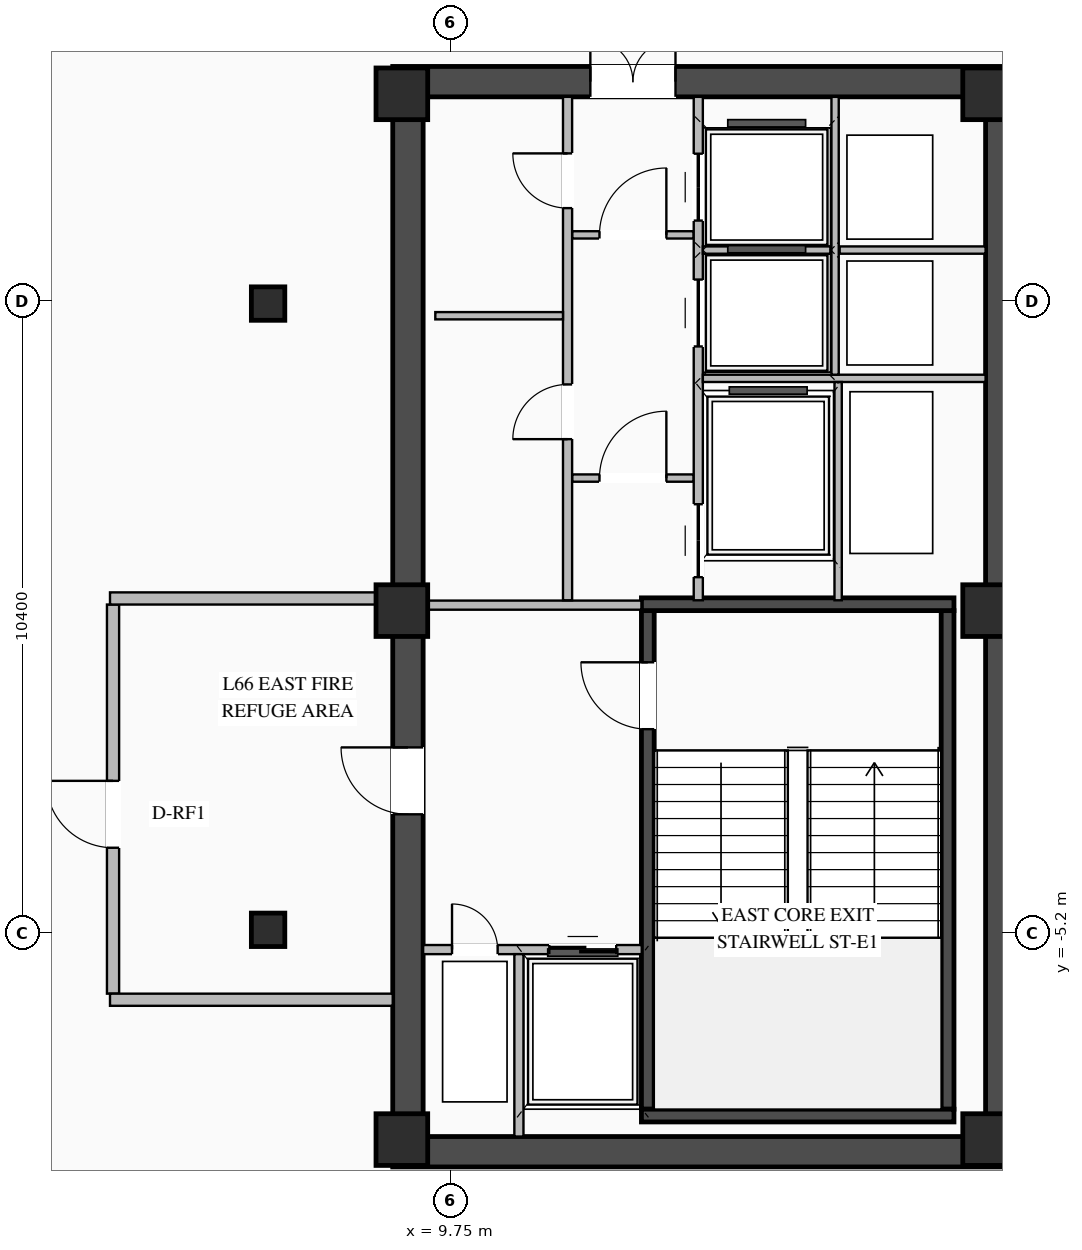
"""IFC4 building model, lengths in metres.
Left out: names, types, materials, properties, quantities, classifications, styles, units other than length and angle.
Written with IfcOpenShell. Run it as: python <this file> out.ifc"""

import sys

from ifc_helpers import new_model, si_unit, direction, frame, frame_2d, origin, origin_2d, place, context, subcontext, project, spatial, rectangle, i_section, extrude, element, fill, save


model = new_model("IFC4")
c1 = context("Model", 3, precision=1e-05, world=origin(), true_north=direction((0.0, 1.0)))
c2 = subcontext(c1, "Body", "Model", "MODEL_VIEW")
j1 = project(units=[si_unit("LENGTHUNIT", "METRE"), si_unit("PLANEANGLEUNIT", "RADIAN")], contexts=[c1])
p1 = place(None, origin())
s1 = spatial("IfcSite", under=j1, at=p1, CompositionType="ELEMENT")
p2 = place(p1, origin())
s2 = spatial("IfcBuilding", under=s1, at=p2, CompositionType="ELEMENT")
p3 = place(p2, frame((0.0, 0.0, 243.0)))
s3 = spatial("IfcBuildingStorey", under=s2, at=p3, CompositionType="ELEMENT", Elevation=243.0)
p4 = place(p3, frame((8.8, -8.8, 0.0), z_axis=(0.0, 0.0, 1.0), x_axis=(1.0, 0.0, 0.0)))
e1 = element("IfcWall", 1, at=p4, inside=s3, PredefinedType="SHEAR", context=c2, shape_type="SweptSolid", body=[
    extrude(rectangle(XDim=10.25, YDim=0.5, at=frame_2d((5.125, 0.0))), origin(), (0.0, 0.0, 1.0), 4.22),
])
p5 = place(p3, frame((8.8, 8.8, 0.0), z_axis=(0.0, 0.0, 1.0), x_axis=(1.0, 0.0, 0.0)))
e2 = element("IfcWall", 2, at=p5, inside=s3, PredefinedType="SHEAR", context=c2, shape_type="SweptSolid", body=[
    extrude(rectangle(XDim=10.25, YDim=0.5, at=frame_2d((5.125, 0.0))), origin(), (0.0, 0.0, 1.0), 4.22),
])
p6 = place(p5, frame((3.25, 0.0, 0.0)))
e3 = element("IfcOpeningElement", 3, at=p6, cuts=e2, PredefinedType="OPENING", context=c2, shape_type="SweptSolid", body=[
    extrude(rectangle(XDim=1.4, YDim=2.05, at=frame_2d((0.7, 1.025))), frame((0.0, 0.26, 0.0), z_axis=(0.0, -1.0, 0.0), x_axis=(1.0, 0.0, 0.0)), (0.0, 0.0, 1.0), 0.52),
])
p7 = place(p3, frame((9.05, -8.55, 0.0), z_axis=(0.0, 0.0, 1.0), x_axis=(0.0, 1.0, 0.0)))
e4 = element("IfcWall", 4, at=p7, inside=s3, PredefinedType="SHEAR", context=c2, shape_type="SweptSolid", body=[
    extrude(rectangle(XDim=17.1, YDim=0.5, at=frame_2d((8.55, 0.0))), origin(), (0.0, 0.0, 1.0), 4.22),
])
p8 = place(p7, frame((5.3, 0.0, 0.0)))
e5 = element("IfcOpeningElement", 5, at=p8, cuts=e4, PredefinedType="OPENING", context=c2, shape_type="SweptSolid", body=[
    extrude(rectangle(XDim=1.1, YDim=2.08, at=frame_2d((0.55, 1.04))), frame((0.0, 0.26, 0.0), z_axis=(0.0, -1.0, 0.0), x_axis=(1.0, 0.0, 0.0)), (0.0, 0.0, 1.0), 0.52),
])
p9 = place(p3, frame((18.8, -8.55, 0.0), z_axis=(0.0, 0.0, 1.0), x_axis=(0.0, 1.0, 0.0)))
e6 = element("IfcWall", 6, at=p9, inside=s3, PredefinedType="SHEAR", context=c2, shape_type="SweptSolid", body=[
    extrude(rectangle(XDim=17.1, YDim=0.5, at=frame_2d((8.55, 0.0))), origin(), (0.0, 0.0, 1.0), 4.22),
])
p10 = place(p3, frame((12.995, -8.1, 0.0), z_axis=(0.0, 0.0, 1.0), x_axis=(0.0, 1.0, 0.0)))
e7 = element("IfcWall", 7, at=p10, inside=s3, PredefinedType="SHEAR", context=c2, shape_type="SweptSolid", body=[
    extrude(rectangle(XDim=8.2, YDim=0.21, at=frame_2d((4.1, 0.0))), origin(), (0.0, 0.0, 1.0), 4.22),
])
p11 = place(p10, frame((6.25, 0.0, 0.0)))
e8 = element("IfcOpeningElement", 8, at=p11, cuts=e7, PredefinedType="OPENING", context=c2, shape_type="SweptSolid", body=[
    extrude(rectangle(XDim=1.1, YDim=2.15, at=frame_2d((0.55, 1.075))), frame((0.0, 0.115, 0.0), z_axis=(0.0, -1.0, 0.0), x_axis=(1.0, 0.0, 0.0)), (0.0, 0.0, 1.0), 0.23),
])
p12 = place(p3, frame((17.925, -8.1, 0.0), z_axis=(0.0, 0.0, 1.0), x_axis=(0.0, 1.0, 0.0)))
e9 = element("IfcWall", 9, at=p12, inside=s3, PredefinedType="SHEAR", context=c2, shape_type="SweptSolid", body=[
    extrude(rectangle(XDim=8.2, YDim=0.21, at=frame_2d((4.1, 0.0))), origin(), (0.0, 0.0, 1.0), 4.22),
])
for number, where, z_axis, x_axis in (
    (10, (12.89, -8.205, 0.0), (0.0, 0.0, 1.0), (1.0, 0.0, 0.0)),
    (11, (18.03, 0.205, 0.0), (0.0, 0.0, 1.0), (-1.0, 0.0, 0.0)),
):
    element("IfcWall", number, at=place(p3, frame(where, z_axis=z_axis, x_axis=x_axis)), inside=s3, PredefinedType="SHEAR", context=c2, shape_type="SweptSolid", body=[
        extrude(rectangle(XDim=5.14, YDim=0.21, at=frame_2d((2.57, 0.0))), origin(), (0.0, 0.0, 1.0), 4.22),
    ])
for number, where, z_axis, x_axis in (
    (12, (8.95, -8.6, 0.0), (0.0, 0.0, 1.0), (1.0, 0.0, 0.0)),
    (13, (8.95, 0.1, 0.0), (0.0, 0.0, 1.0), (1.0, 0.0, 0.0)),
    (14, (8.95, 8.6, 0.0), (0.0, 0.0, 1.0), (1.0, 0.0, 0.0)),
    (15, (18.6, -8.6, 0.0), (0.0, 0.0, 1.0), (1.0, 0.0, 0.0)),
    (16, (18.6, 0.1, 0.0), (0.0, 0.0, 1.0), (1.0, 0.0, 0.0)),
    (17, (18.6, 8.6, 0.0), (0.0, 0.0, 1.0), (1.0, 0.0, 0.0)),
):
    element("IfcColumn", number, at=place(p3, frame(where, z_axis=z_axis, x_axis=x_axis)), inside=s3, PredefinedType="COLUMN", context=c2, shape_type="SweptSolid", body=[
        extrude(rectangle(XDim=0.85, YDim=0.85, at=origin_2d()), origin(), (0.0, 0.0, 1.0), 4.5),
    ])
for number, where, z_axis, x_axis in (
    (18, (6.75, -5.15, 0.0), (0.0, 0.0, 1.0), (1.0, 0.0, 0.0)),
    (19, (6.75, 5.15, 0.0), (0.0, 0.0, 1.0), (1.0, 0.0, 0.0)),
):
    element("IfcColumn", number, at=place(p3, frame(where, z_axis=z_axis, x_axis=x_axis)), inside=s3, PredefinedType="COLUMN", context=c2, shape_type="SweptSolid", body=[
        extrude(i_section(OverallWidth=0.55, OverallDepth=0.55, WebThickness=0.024, FlangeThickness=0.036, at=origin_2d()), origin(), (0.0, 0.0, 1.0), 4.5),
    ])
p13 = place(p3, frame((9.3, -5.475, 0.0), z_axis=(0.0, 0.0, 1.0), x_axis=(1.0, 0.0, 0.0)))
e20 = element("IfcWall", 20, at=p13, inside=s3, PredefinedType="STANDARD", context=c2, shape_type="SweptSolid", body=[
    extrude(rectangle(XDim=3.595, YDim=0.15, at=frame_2d((1.797, 0.0))), origin(), (0.0, 0.0, 1.0), 4.2),
])
p14 = place(p13, frame((2.075, 0.0, 0.0)))
e21 = element("IfcOpeningElement", 21, at=p14, cuts=e20, PredefinedType="OPENING", context=c2, shape_type="SweptSolid", body=[
    extrude(rectangle(XDim=1.1, YDim=2.15, at=frame_2d((0.55, 1.075))), frame((0.0, 0.085, 0.0), z_axis=(0.0, -1.0, 0.0), x_axis=(1.0, 0.0, 0.0)), (0.0, 0.0, 1.0), 0.17),
])
p15 = place(p13, frame((0.475, 0.0, 0.0)))
e22 = element("IfcOpeningElement", 22, at=p15, cuts=e20, PredefinedType="OPENING", context=c2, shape_type="SweptSolid", body=[
    extrude(rectangle(XDim=0.75, YDim=2.05, at=frame_2d((0.375, 1.025))), frame((0.0, 0.085, 0.0), z_axis=(0.0, -1.0, 0.0), x_axis=(1.0, 0.0, 0.0)), (0.0, 0.0, 1.0), 0.17),
])
p16 = place(p3, frame((10.875, -8.55, 0.0), z_axis=(0.0, 0.0, 1.0), x_axis=(0.0, 1.0, 0.0)))
e23 = element("IfcWall", 23, at=p16, inside=s3, PredefinedType="STANDARD", context=c2, shape_type="SweptSolid", body=[
    extrude(rectangle(XDim=3.0, YDim=0.15, at=frame_2d((1.5, 0.0))), origin(), (0.0, 0.0, 1.0), 4.2),
])
p17 = place(p3, frame((9.3, 0.19, 0.0), z_axis=(0.0, 0.0, 1.0), x_axis=(1.0, 0.0, 0.0)))
e24 = element("IfcWall", 24, at=p17, inside=s3, PredefinedType="STANDARD", context=c2, shape_type="SweptSolid", body=[
    extrude(rectangle(XDim=3.59, YDim=0.15, at=frame_2d((1.795, 0.0))), origin(), (0.0, 0.0, 1.0), 3.595),
])
p18 = place(p3, frame((11.75, 2.28, 0.0), z_axis=(0.0, 0.0, 1.0), x_axis=(1.0, 0.0, 0.0)))
e25 = element("IfcWall", 25, at=p18, inside=s3, PredefinedType="STANDARD", context=c2, shape_type="SweptSolid", body=[
    extrude(rectangle(XDim=2.0, YDim=0.12, at=frame_2d((1.0, 0.0))), origin(), (0.0, 0.0, 1.0), 4.2),
])
p19 = place(p18, frame((0.45, 0.0, 0.0)))
e26 = element("IfcOpeningElement", 26, at=p19, cuts=e25, PredefinedType="OPENING", context=c2, shape_type="SweptSolid", body=[
    extrude(rectangle(XDim=1.1, YDim=2.1, at=frame_2d((0.55, 1.05))), frame((0.0, 0.07, 0.0), z_axis=(0.0, -1.0, 0.0), x_axis=(1.0, 0.0, 0.0)), (0.0, 0.0, 1.0), 0.14),
])
p20 = place(p3, frame((11.75, 6.28, 0.0), z_axis=(0.0, 0.0, 1.0), x_axis=(1.0, 0.0, 0.0)))
e27 = element("IfcWall", 27, at=p20, inside=s3, PredefinedType="STANDARD", context=c2, shape_type="SweptSolid", body=[
    extrude(rectangle(XDim=2.0, YDim=0.12, at=frame_2d((1.0, 0.0))), origin(), (0.0, 0.0, 1.0), 4.2),
])
p21 = place(p20, frame((0.45, 0.0, 0.0)))
e28 = element("IfcOpeningElement", 28, at=p21, cuts=e27, PredefinedType="OPENING", context=c2, shape_type="SweptSolid", body=[
    extrude(rectangle(XDim=1.1, YDim=2.1, at=frame_2d((0.55, 1.05))), frame((0.0, 0.07, 0.0), z_axis=(0.0, -1.0, 0.0), x_axis=(1.0, 0.0, 0.0)), (0.0, 0.0, 1.0), 0.14),
])
p22 = place(p3, frame((11.675, 0.27, 0.0), z_axis=(0.0, 0.0, 1.0), x_axis=(0.0, 1.0, 0.0)))
e29 = element("IfcWall", 29, at=p22, inside=s3, PredefinedType="STANDARD", context=c2, shape_type="SweptSolid", body=[
    extrude(rectangle(XDim=8.28, YDim=0.15, at=frame_2d((4.14, 0.0))), origin(), (0.0, 0.0, 1.0), 4.2),
])
p23 = place(p22, frame((2.65, 0.0, 0.0)))
e30 = element("IfcOpeningElement", 30, at=p23, cuts=e29, PredefinedType="OPENING", context=c2, shape_type="SweptSolid", body=[
    extrude(rectangle(XDim=0.9, YDim=2.05, at=frame_2d((0.45, 1.025))), frame((0.0, 0.085, 0.0), z_axis=(0.0, -1.0, 0.0), x_axis=(1.0, 0.0, 0.0)), (0.0, 0.0, 1.0), 0.17),
])
p24 = place(p22, frame((6.45, 0.0, 0.0)))
e31 = element("IfcOpeningElement", 31, at=p24, cuts=e29, PredefinedType="OPENING", context=c2, shape_type="SweptSolid", body=[
    extrude(rectangle(XDim=0.9, YDim=2.05, at=frame_2d((0.45, 1.025))), frame((0.0, 0.085, 0.0), z_axis=(0.0, -1.0, 0.0), x_axis=(1.0, 0.0, 0.0)), (0.0, 0.0, 1.0), 0.17),
])
p25 = place(p3, frame((9.5, 4.95, 0.0), z_axis=(0.0, 0.0, 1.0), x_axis=(1.0, 0.0, 0.0)))
e32 = element("IfcWall", 32, at=p25, inside=s3, PredefinedType="STANDARD", context=c2, shape_type="SweptSolid", body=[
    extrude(rectangle(XDim=2.1, YDim=0.12, at=frame_2d((1.05, 0.0))), origin(), (0.0, 0.0, 1.0), 4.2),
])
p26 = place(p3, frame((13.825, 0.27, 0.0), z_axis=(0.0, 0.0, 1.0), x_axis=(0.0, 1.0, 0.0)))
e33 = element("IfcWall", 33, at=p26, inside=s3, PredefinedType="STANDARD", context=c2, shape_type="SweptSolid", body=[
    extrude(rectangle(XDim=8.28, YDim=0.15, at=frame_2d((4.14, 0.0))), origin(), (0.0, 0.0, 1.0), 4.2),
])
p27 = place(p26, frame((4.175, 0.0, 0.0)))
e34 = element("IfcOpeningElement", 34, at=p27, cuts=e33, PredefinedType="OPENING", context=c2, shape_type="SweptSolid", body=[
    extrude(rectangle(XDim=1.1, YDim=2.1, at=frame_2d((0.55, 1.05))), frame((0.0, 0.085, 0.0), z_axis=(0.0, -1.0, 0.0), x_axis=(1.0, 0.0, 0.0)), (0.0, 0.0, 1.0), 0.17),
])
p28 = place(p26, frame((6.245, 0.0, 0.0)))
e35 = element("IfcOpeningElement", 35, at=p28, cuts=e33, PredefinedType="OPENING", context=c2, shape_type="SweptSolid", body=[
    extrude(rectangle(XDim=1.1, YDim=2.1, at=frame_2d((0.55, 1.05))), frame((0.0, 0.085, 0.0), z_axis=(0.0, -1.0, 0.0), x_axis=(1.0, 0.0, 0.0)), (0.0, 0.0, 1.0), 0.17),
])
p29 = place(p26, frame((0.38, 0.0, 0.0)))
e36 = element("IfcOpeningElement", 36, at=p29, cuts=e33, PredefinedType="OPENING", context=c2, shape_type="SweptSolid", body=[
    extrude(rectangle(XDim=1.2, YDim=2.1, at=frame_2d((0.6, 1.05))), frame((0.0, 0.085, 0.0), z_axis=(0.0, -1.0, 0.0), x_axis=(1.0, 0.0, 0.0)), (0.0, 0.0, 1.0), 0.17),
])
p30 = place(p3, frame((13.9, 3.92, 0.0), z_axis=(0.0, 0.0, 1.0), x_axis=(1.0, 0.0, 0.0)))
e37 = element("IfcWall", 37, at=p30, inside=s3, PredefinedType="STANDARD", context=c2, shape_type="SweptSolid", body=[
    extrude(rectangle(XDim=4.65, YDim=0.12, at=frame_2d((2.325, 0.0))), origin(), (0.0, 0.0, 1.0), 4.2),
])
p31 = place(p3, frame((16.15, 6.03, 0.0), z_axis=(0.0, 0.0, 1.0), x_axis=(1.0, 0.0, 0.0)))
e38 = element("IfcWall", 38, at=p31, inside=s3, PredefinedType="STANDARD", context=c2, shape_type="SweptSolid", body=[
    extrude(rectangle(XDim=2.4, YDim=0.12, at=frame_2d((1.2, 0.0))), origin(), (0.0, 0.0, 1.0), 4.2),
])
p32 = place(p3, frame((16.075, 3.98, 0.0), z_axis=(0.0, 0.0, 1.0), x_axis=(0.0, 1.0, 0.0)))
e39 = element("IfcWall", 39, at=p32, inside=s3, PredefinedType="STANDARD", context=c2, shape_type="SweptSolid", body=[
    extrude(rectangle(XDim=4.57, YDim=0.12, at=frame_2d((2.285, 0.0))), origin(), (0.0, 0.0, 1.0), 4.2),
])
p33 = place(p3, frame((13.9, 6.03, 0.0), z_axis=(0.0, 0.0, 1.0), x_axis=(1.0, 0.0, 0.0)))
e40 = element("IfcWall", 40, at=p33, inside=s3, PredefinedType="STANDARD", context=c2, shape_type="SweptSolid", body=[
    extrude(rectangle(XDim=2.1, YDim=0.12, at=frame_2d((1.05, 0.0))), origin(), (0.0, 0.0, 1.0), 4.2),
])
p34 = place(p3, frame((16.125, 0.27, 0.0), z_axis=(0.0, 0.0, 1.0), x_axis=(0.0, 1.0, 0.0)))
e41 = element("IfcWall", 41, at=p34, inside=s3, PredefinedType="STANDARD", context=c2, shape_type="SweptSolid", body=[
    extrude(rectangle(XDim=3.59, YDim=0.12, at=frame_2d((1.795, 0.0))), origin(), (0.0, 0.0, 1.0), 4.2),
])
p35 = place(p3, frame((4.2, -6.2, 0.0), z_axis=(0.0, 0.0, 1.0), x_axis=(0.0, 1.0, 0.0)))
e42 = element("IfcWall", 42, at=p35, inside=s3, PredefinedType="STANDARD", context=c2, shape_type="SweptSolid", body=[
    extrude(rectangle(XDim=6.4, YDim=0.2, at=frame_2d((3.2, 0.0))), origin(), (0.0, 0.0, 1.0), 4.2),
])
p36 = place(p35, frame((2.4, 0.0, 0.0)))
e43 = element("IfcOpeningElement", 43, at=p36, cuts=e42, PredefinedType="OPENING", context=c2, shape_type="SweptSolid", body=[
    extrude(rectangle(XDim=1.1, YDim=2.08, at=frame_2d((0.55, 1.04))), frame((0.0, 0.11, 0.0), z_axis=(0.0, -1.0, 0.0), x_axis=(1.0, 0.0, 0.0)), (0.0, 0.0, 1.0), 0.22),
])
for number, where, z_axis, x_axis in (
    (44, (4.15, -6.3, 0.0), (0.0, 0.0, 1.0), (1.0, 0.0, 0.0)),
    (45, (4.15, 0.3, 0.0), (0.0, 0.0, 1.0), (1.0, 0.0, 0.0)),
):
    element("IfcWall", number, at=place(p3, frame(where, z_axis=z_axis, x_axis=x_axis)), inside=s3, PredefinedType="STANDARD", context=c2, shape_type="SweptSolid", body=[
        extrude(rectangle(XDim=4.65, YDim=0.2, at=frame_2d((2.325, 0.0))), origin(), (0.0, 0.0, 1.0), 4.2),
    ])
p37 = place(p11, origin())
e46 = element("IfcDoor", 46, at=p37, inside=s3, OperationType="SINGLE_SWING_RIGHT", PredefinedType="DOOR", context=c2, shape_type="SweptSolid", body=[
    extrude(rectangle(XDim=1.1, YDim=2.15, at=frame_2d((0.55, 1.075))), frame((0.0, 0.025, 0.0), z_axis=(0.0, -1.0, 0.0), x_axis=(1.0, 0.0, 0.0)), (0.0, 0.0, 1.0), 0.05),
])
fill(e8, e46)
p38 = place(p14, origin())
e47 = element("IfcDoor", 47, at=p38, inside=s3, OperationType="DOUBLE_DOOR_SLIDING", PredefinedType="DOOR", context=c2, shape_type="SweptSolid", body=[
    extrude(rectangle(XDim=1.1, YDim=2.15, at=frame_2d((0.55, 1.075))), frame((0.0, 0.025, 0.0), z_axis=(0.0, -1.0, 0.0), x_axis=(1.0, 0.0, 0.0)), (0.0, 0.0, 1.0), 0.05),
])
fill(e21, e47)
p39 = place(p15, origin())
e48 = element("IfcDoor", 48, at=p39, inside=s3, OperationType="SINGLE_SWING_LEFT", PredefinedType="DOOR", context=c2, shape_type="SweptSolid", body=[
    extrude(rectangle(XDim=0.75, YDim=2.05, at=frame_2d((0.375, 1.025))), frame((0.0, 0.025, 0.0), z_axis=(0.0, -1.0, 0.0), x_axis=(1.0, 0.0, 0.0)), (0.0, 0.0, 1.0), 0.05),
])
fill(e22, e48)
p40 = place(p8, origin())
e49 = element("IfcDoor", 49, at=p40, inside=s3, OperationType="SINGLE_SWING_RIGHT", PredefinedType="DOOR", context=c2, shape_type="SweptSolid", body=[
    extrude(rectangle(XDim=1.1, YDim=2.08, at=frame_2d((0.55, 1.04))), frame((0.0, -0.155, 0.0), z_axis=(0.0, -1.0, 0.0), x_axis=(1.0, 0.0, 0.0)), (0.0, 0.0, 1.0), 0.05),
])
fill(e5, e49)
p41 = place(p19, origin())
e50 = element("IfcDoor", 50, at=p41, inside=s3, OperationType="SINGLE_SWING_RIGHT", PredefinedType="DOOR", context=c2, shape_type="SweptSolid", body=[
    extrude(rectangle(XDim=1.1, YDim=2.1, at=frame_2d((0.55, 1.05))), frame((0.0, 0.025, 0.0), z_axis=(0.0, -1.0, 0.0), x_axis=(1.0, 0.0, 0.0)), (0.0, 0.0, 1.0), 0.05),
])
fill(e26, e50)
p42 = place(p21, origin())
e51 = element("IfcDoor", 51, at=p42, inside=s3, OperationType="SINGLE_SWING_RIGHT", PredefinedType="DOOR", context=c2, shape_type="SweptSolid", body=[
    extrude(rectangle(XDim=1.1, YDim=2.1, at=frame_2d((0.55, 1.05))), frame((0.0, 0.025, 0.0), z_axis=(0.0, -1.0, 0.0), x_axis=(1.0, 0.0, 0.0)), (0.0, 0.0, 1.0), 0.05),
])
fill(e28, e51)
p43 = place(p6, origin())
e52 = element("IfcDoor", 52, at=p43, inside=s3, OperationType="DOUBLE_DOOR_SINGLE_SWING", PredefinedType="DOOR", context=c2, shape_type="SweptSolid", body=[
    extrude(rectangle(XDim=1.4, YDim=2.05, at=frame_2d((0.7, 1.025))), frame((0.0, 0.195, 0.0), z_axis=(0.0, -1.0, 0.0), x_axis=(1.0, 0.0, 0.0)), (0.0, 0.0, 1.0), 0.05),
])
fill(e3, e52)
p44 = place(p23, origin())
e53 = element("IfcDoor", 53, at=p44, inside=s3, OperationType="SINGLE_SWING_LEFT", PredefinedType="DOOR", context=c2, shape_type="SweptSolid", body=[
    extrude(rectangle(XDim=0.9, YDim=2.05, at=frame_2d((0.45, 1.025))), frame((0.0, 0.025, 0.0), z_axis=(0.0, -1.0, 0.0), x_axis=(1.0, 0.0, 0.0)), (0.0, 0.0, 1.0), 0.05),
])
fill(e30, e53)
p45 = place(p24, origin())
e54 = element("IfcDoor", 54, at=p45, inside=s3, OperationType="SINGLE_SWING_RIGHT", PredefinedType="DOOR", context=c2, shape_type="SweptSolid", body=[
    extrude(rectangle(XDim=0.9, YDim=2.05, at=frame_2d((0.45, 1.025))), frame((0.0, 0.025, 0.0), z_axis=(0.0, -1.0, 0.0), x_axis=(1.0, 0.0, 0.0)), (0.0, 0.0, 1.0), 0.05),
])
fill(e31, e54)
p46 = place(p27, origin())
e55 = element("IfcDoor", 55, at=p46, inside=s3, OperationType="DOUBLE_DOOR_SLIDING", PredefinedType="DOOR", context=c2, shape_type="SweptSolid", body=[
    extrude(rectangle(XDim=1.1, YDim=2.1, at=frame_2d((0.55, 1.05))), frame((0.0, 0.025, 0.0), z_axis=(0.0, -1.0, 0.0), x_axis=(1.0, 0.0, 0.0)), (0.0, 0.0, 1.0), 0.05),
])
fill(e34, e55)
p47 = place(p28, origin())
e56 = element("IfcDoor", 56, at=p47, inside=s3, OperationType="DOUBLE_DOOR_SLIDING", PredefinedType="DOOR", context=c2, shape_type="SweptSolid", body=[
    extrude(rectangle(XDim=1.1, YDim=2.1, at=frame_2d((0.55, 1.05))), frame((0.0, 0.025, 0.0), z_axis=(0.0, -1.0, 0.0), x_axis=(1.0, 0.0, 0.0)), (0.0, 0.0, 1.0), 0.05),
])
fill(e35, e56)
p48 = place(p29, origin())
e57 = element("IfcDoor", 57, at=p48, inside=s3, OperationType="DOUBLE_DOOR_SLIDING", PredefinedType="DOOR", context=c2, shape_type="SweptSolid", body=[
    extrude(rectangle(XDim=1.2, YDim=2.1, at=frame_2d((0.6, 1.05))), frame((0.0, 0.025, 0.0), z_axis=(0.0, -1.0, 0.0), x_axis=(1.0, 0.0, 0.0)), (0.0, 0.0, 1.0), 0.05),
])
fill(e36, e57)
p49 = place(p36, origin())
e58 = element("IfcDoor", 58, at=p49, inside=s3, OperationType="SINGLE_SWING_RIGHT", PredefinedType="DOOR", context=c2, shape_type="SweptSolid", body=[
    extrude(rectangle(XDim=1.1, YDim=2.08, at=frame_2d((0.55, 1.04))), frame((0.0, 0.025, 0.0), z_axis=(0.0, -1.0, 0.0), x_axis=(1.0, 0.0, 0.0)), (0.0, 0.0, 1.0), 0.05),
])
fill(e43, e58)
save(model, sys.argv[1])
